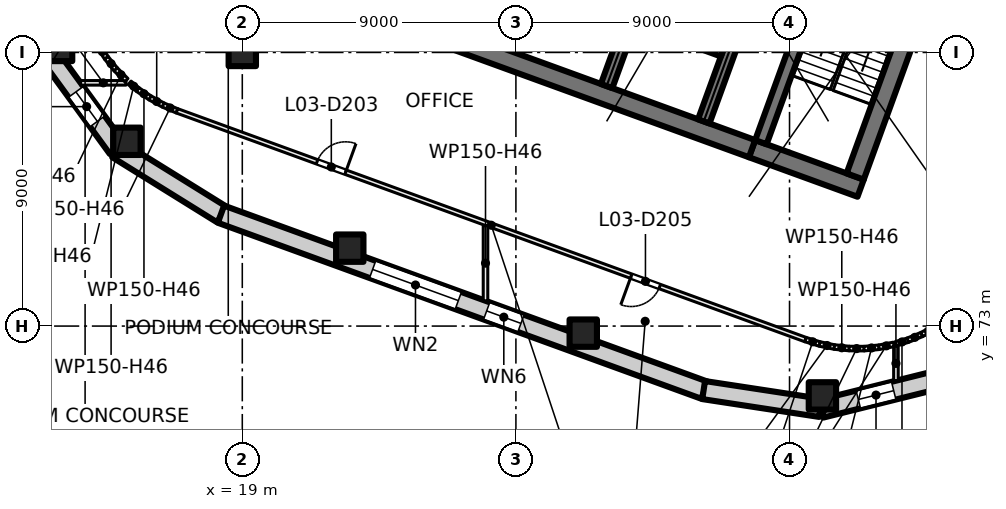
"""IFC4 building model, lengths in metres.
Left out: names, types, materials, properties, quantities, classifications, styles, units other than length and angle.
Written with IfcOpenShell. Run it as: python <this file> out.ifc"""

import sys

from ifc_helpers import new_model, si_unit, direction, frame, frame_2d, origin, origin_2d, place, context, subcontext, project, spatial, rectangle, extrude, element, fill, save


model = new_model("IFC4")
c1 = context("Model", 3, precision=1e-05, world=origin(), true_north=direction((0.0, 1.0)))
c2 = subcontext(c1, "Body", "Model", "MODEL_VIEW")
j1 = project(units=[si_unit("LENGTHUNIT", "METRE"), si_unit("PLANEANGLEUNIT", "RADIAN")], contexts=[c1])
p1 = place(None, origin())
s1 = spatial("IfcSite", under=j1, at=p1, CompositionType="ELEMENT")
p2 = place(p1, origin())
s2 = spatial("IfcBuilding", under=s1, at=p2, CompositionType="ELEMENT")
p3 = place(p2, frame((0.0, 0.0, 17.5)))
s3 = spatial("IfcBuildingStorey", under=s2, at=p3, CompositionType="ELEMENT", Elevation=17.5)
for number, where, z_axis, x_axis in (
    (1, (19.0, 82.0, 0.0), (0.0, 0.0, 1.0), (1.0, 0.0, 0.0)),
    (2, (38.082, 70.704, 0.0), (0.0, 0.0, 1.0), (1.0, 0.0, 0.0)),
    (3, (30.215, 72.768, 0.0), (0.0, 0.0, 1.0), (1.0, 0.0, 0.0)),
    (4, (22.535, 75.563, 0.0), (0.0, 0.0, 1.0), (1.0, 0.0, 0.0)),
    (5, (15.205, 79.078, 0.0), (0.0, 0.0, 1.0), (1.0, 0.0, 0.0)),
    (6, (12.958, 82.164, 0.0), (0.0, 0.0, 1.0), (1.0, 0.0, 0.0)),
):
    element("IfcColumn", number, at=place(p3, frame(where, z_axis=z_axis, x_axis=x_axis)), inside=s3, PredefinedType="COLUMN", context=c2, shape_type="SweptSolid", body=[
        extrude(rectangle(XDim=0.9, YDim=0.9, at=origin_2d()), origin(), (0.0, 0.0, 1.0), 5.0),
    ])
p4 = place(p3, frame((39.338, 77.535, 0.0), z_axis=(0.0, 0.0, 1.0), x_axis=(-0.939701471648, 0.341995824804, 0.0)))
e7 = element("IfcWall", 7, at=p4, inside=s3, PredefinedType="SHEAR", context=c2, shape_type="SweptSolid", body=[
    extrude(rectangle(XDim=3.8, YDim=0.6, at=frame_2d((1.9, 0.0))), origin(), (0.0, 0.0, 1.0), 5.0),
])
p5 = place(p3, frame((35.767, 78.835, 0.0), z_axis=(0.0, 0.0, 1.0), x_axis=(-0.939692894512, 0.342019391267, 0.0)))
e8 = element("IfcWall", 8, at=p5, inside=s3, PredefinedType="SHEAR", context=c2, shape_type="SweptSolid", body=[
    extrude(rectangle(XDim=14.4, YDim=0.6, at=frame_2d((7.2, 0.0))), origin(), (0.0, 0.0, 1.0), 5.0),
])
p6 = place(p3, frame((39.159, 77.92, 0.0), z_axis=(0.0, 0.0, 1.0), x_axis=(0.342016982193, 0.939693771338, 0.0)))
e9 = element("IfcWall", 9, at=p6, inside=s3, PredefinedType="SHEAR", context=c2, shape_type="SweptSolid", body=[
    extrude(rectangle(XDim=7.8, YDim=0.6, at=frame_2d((3.9, 0.0))), origin(), (0.0, 0.0, 1.0), 5.0),
])
p7 = place(p3, frame((36.058, 79.048, 0.0), z_axis=(0.0, 0.0, 1.0), x_axis=(0.342016982193, 0.939693771338, 0.0)))
e10 = element("IfcWall", 10, at=p7, inside=s3, PredefinedType="SHEAR", context=c2, shape_type="SweptSolid", body=[
    extrude(rectangle(XDim=7.8, YDim=0.4, at=frame_2d((3.9, 0.0))), origin(), (0.0, 0.0, 1.0), 5.0),
])
p8 = place(p3, frame((30.984, 80.895, 0.0), z_axis=(0.0, 0.0, 1.0), x_axis=(0.342021021735, 0.939692301071, 0.0)))
e11 = element("IfcWall", 11, at=p8, inside=s3, PredefinedType="SHEAR", context=c2, shape_type="SweptSolid", body=[
    extrude(rectangle(XDim=12.2, YDim=0.4, at=frame_2d((6.1, 0.0))), origin(), (0.0, 0.0, 1.0), 5.0),
])
p9 = place(p8, frame((5.45, 0.0, 0.0)))
e12 = element("IfcOpeningElement", 12, at=p9, cuts=e11, PredefinedType="OPENING", context=c2, shape_type="SweptSolid", body=[
    extrude(rectangle(XDim=1.1, YDim=2.1, at=frame_2d((0.55, 1.05))), frame((0.0, 0.21, 0.0), z_axis=(0.0, -1.0, 0.0), x_axis=(1.0, 0.0, 0.0)), (0.0, 0.0, 1.0), 0.42),
])
p10 = place(p8, frame((7.85, 0.0, 0.0)))
e13 = element("IfcOpeningElement", 13, at=p10, cuts=e11, PredefinedType="OPENING", context=c2, shape_type="SweptSolid", body=[
    extrude(rectangle(XDim=1.1, YDim=2.1, at=frame_2d((0.55, 1.05))), frame((0.0, 0.21, 0.0), z_axis=(0.0, -1.0, 0.0), x_axis=(1.0, 0.0, 0.0)), (0.0, 0.0, 1.0), 0.42),
])
p11 = place(p8, frame((10.25, 0.0, 0.0)))
e14 = element("IfcOpeningElement", 14, at=p11, cuts=e11, PredefinedType="OPENING", context=c2, shape_type="SweptSolid", body=[
    extrude(rectangle(XDim=1.1, YDim=2.1, at=frame_2d((0.55, 1.05))), frame((0.0, 0.21, 0.0), z_axis=(0.0, -1.0, 0.0), x_axis=(1.0, 0.0, 0.0)), (0.0, 0.0, 1.0), 0.42),
])
p12 = place(p3, frame((34.178, 79.732, 0.0), z_axis=(0.0, 0.0, 1.0), x_axis=(0.342014590177, 0.939694641948, 0.0)))
e15 = element("IfcWall", 15, at=p12, inside=s3, PredefinedType="SHEAR", context=c2, shape_type="SweptSolid", body=[
    extrude(rectangle(XDim=12.2, YDim=0.4, at=frame_2d((6.1, 0.0))), origin(), (0.0, 0.0, 1.0), 5.0),
])
p13 = place(p3, frame((34.812, 82.056, 0.0), z_axis=(0.0, 0.0, 1.0), x_axis=(-0.939686455819, 0.342037080957, 0.0)))
e16 = element("IfcWall", 16, at=p13, inside=s3, PredefinedType="SHEAR", context=c2, shape_type="SweptSolid", body=[
    extrude(rectangle(XDim=3.0, YDim=0.4, at=frame_2d((1.5, 0.0))), origin(), (0.0, 0.0, 1.0), 5.0),
])
p14 = place(p3, frame((12.571, 82.061, 0.0), z_axis=(0.0, 0.0, 1.0), x_axis=(-0.240896747667, 0.970550749298, 0.0)))
e17 = element("IfcWall", 17, at=p14, inside=s3, PredefinedType="SOLIDWALL", context=c2, shape_type="SweptSolid", body=[
    extrude(rectangle(XDim=3.962, YDim=0.6, at=frame_2d((1.981, 0.0))), origin(), (0.0, 0.0, 1.0), 4.6),
])
p15 = place(p3, frame((14.885, 78.837, 0.0), z_axis=(0.0, 0.0, 1.0), x_axis=(-0.588600339707, 0.808424170901, 0.0)))
e18 = element("IfcWall", 18, at=p15, inside=s3, PredefinedType="SOLIDWALL", context=c2, shape_type="SweptSolid", body=[
    extrude(rectangle(XDim=3.962, YDim=0.6, at=frame_2d((1.981, 0.0))), origin(), (0.0, 0.0, 1.0), 4.6),
])
p16 = place(p15, frame((1.108, 0.0, 0.9)))
e19 = element("IfcOpeningElement", 19, at=p16, cuts=e18, PredefinedType="OPENING", context=c2, shape_type="SweptSolid", body=[
    extrude(rectangle(XDim=1.2, YDim=3.0, at=frame_2d((0.6, 1.5))), frame((0.0, 0.31, 0.0), z_axis=(0.0, -1.0, 0.0), x_axis=(1.0, 0.0, 0.0)), (0.0, 0.0, 1.0), 0.62),
])
p17 = place(p3, frame((18.329, 76.668, 0.0), z_axis=(0.0, 0.0, 1.0), x_axis=(-0.849679171995, 0.527300013918, 0.0)))
e20 = element("IfcWall", 20, at=p17, inside=s3, PredefinedType="SOLIDWALL", context=c2, shape_type="SweptSolid", body=[
    extrude(rectangle(XDim=4.062, YDim=0.6, at=frame_2d((2.031, 0.0))), origin(), (0.0, 0.0, 1.0), 4.6),
])
p18 = place(p3, frame((34.204, 70.89, 0.0), z_axis=(0.0, 0.0, 1.0), x_axis=(-0.939693996621, 0.342016363227, 0.0)))
e21 = element("IfcWall", 21, at=p18, inside=s3, PredefinedType="SOLIDWALL", context=c2, shape_type="SweptSolid", body=[
    extrude(rectangle(XDim=16.926, YDim=0.6, at=frame_2d((8.463, 0.0))), origin(), (0.0, 0.0, 1.0), 4.6),
])
p19 = place(p18, frame((6.426, 0.0, 0.9)))
e22 = element("IfcOpeningElement", 22, at=p19, cuts=e21, PredefinedType="OPENING", context=c2, shape_type="SweptSolid", body=[
    extrude(rectangle(XDim=1.2, YDim=3.0, at=frame_2d((0.6, 1.5))), frame((0.0, 0.31, 0.0), z_axis=(0.0, -1.0, 0.0), x_axis=(1.0, 0.0, 0.0)), (0.0, 0.0, 1.0), 0.62),
])
p20 = place(p18, frame((8.618, 0.0, 0.9)))
e23 = element("IfcOpeningElement", 23, at=p20, cuts=e21, PredefinedType="OPENING", context=c2, shape_type="SweptSolid", body=[
    extrude(rectangle(XDim=3.0, YDim=3.0, at=frame_2d((1.5, 1.5))), frame((0.0, 0.31, 0.0), z_axis=(0.0, -1.0, 0.0), x_axis=(1.0, 0.0, 0.0)), (0.0, 0.0, 1.0), 0.62),
])
p21 = place(p3, frame((38.022, 70.308, 0.0), z_axis=(0.0, 0.0, 1.0), x_axis=(-0.98857030495, 0.150760578968, 0.0)))
e24 = element("IfcWall", 24, at=p21, inside=s3, PredefinedType="SOLIDWALL", context=c2, shape_type="SweptSolid", body=[
    extrude(rectangle(XDim=3.891, YDim=0.6, at=frame_2d((1.946, 0.0))), origin(), (0.0, 0.0, 1.0), 4.6),
])
p22 = place(p3, frame((41.954, 71.255, 0.0), z_axis=(0.0, 0.0, 1.0), x_axis=(-0.970377180078, -0.241594967628, 0.0)))
e25 = element("IfcWall", 25, at=p22, inside=s3, PredefinedType="SOLIDWALL", context=c2, shape_type="SweptSolid", body=[
    extrude(rectangle(XDim=4.031, YDim=0.6, at=frame_2d((2.016, 0.0))), origin(), (0.0, 0.0, 1.0), 4.6),
])
p23 = place(p22, frame((1.574, 0.0, 0.9)))
e26 = element("IfcOpeningElement", 26, at=p23, cuts=e25, PredefinedType="OPENING", context=c2, shape_type="SweptSolid", body=[
    extrude(rectangle(XDim=1.2, YDim=3.0, at=frame_2d((0.6, 1.5))), frame((0.0, 0.31, 0.0), z_axis=(0.0, -1.0, 0.0), x_axis=(1.0, 0.0, 0.0)), (0.0, 0.0, 1.0), 0.62),
])
p24 = place(p3, frame((13.681, 81.0, 0.0), z_axis=(0.0, 0.0, 1.0), x_axis=(1.0, 0.0, 0.0)))
e27 = element("IfcWall", 27, at=p24, inside=s3, PredefinedType="PARTITIONING", context=c2, shape_type="SweptSolid", body=[
    extrude(rectangle(XDim=1.495, YDim=0.15, at=frame_2d((0.748, 0.0))), origin(), (0.0, 0.0, 1.0), 4.6),
])
for number, where, z_axis, x_axis in (
    (28, (14.258, 82.234, 0.0), (0.0, 0.0, 1.0), (0.55, -0.835, 0.0)),
    (29, (14.528, 81.824, 0.0), (0.0, 0.0, 1.0), (0.629, -0.778, 0.0)),
):
    element("IfcWall", number, at=place(p3, frame(where, z_axis=z_axis, x_axis=x_axis)), inside=s3, PredefinedType="PARTITIONING", context=c2, shape_type="SweptSolid", body=[
        extrude(rectangle(XDim=0.498, YDim=0.15, at=frame_2d((0.249, 0.0))), origin(), (0.0, 0.0, 1.0), 4.6),
    ])
p25 = place(p3, frame((14.836, 81.443, 0.0), z_axis=(0.0, 0.0, 1.0), x_axis=(0.702939506556, -0.711249639805, 0.0)))
e30 = element("IfcWall", 30, at=p25, inside=s3, PredefinedType="PARTITIONING", context=c2, shape_type="SweptSolid", body=[
    extrude(rectangle(XDim=0.5, YDim=0.15, at=frame_2d((0.25, 0.0))), origin(), (0.0, 0.0, 1.0), 4.6),
])
p26 = place(p3, frame((15.294, 81.0, 0.0), z_axis=(0.0, 0.0, 1.0), x_axis=(0.770605931108, -0.637311932213, 0.0)))
e31 = element("IfcWall", 31, at=p26, inside=s3, PredefinedType="PARTITIONING", context=c2, shape_type="SweptSolid", body=[
    extrude(rectangle(XDim=0.352, YDim=0.15, at=frame_2d((0.176, 0.0))), origin(), (0.0, 0.0, 1.0), 4.6),
])
p27 = place(p3, frame((15.559, 80.78, 0.0), z_axis=(0.0, 0.0, 1.0), x_axis=(0.828490672822, -0.560002861641, 0.0)))
e32 = element("IfcWall", 32, at=p27, inside=s3, PredefinedType="PARTITIONING", context=c2, shape_type="SweptSolid", body=[
    extrude(rectangle(XDim=0.498, YDim=0.15, at=frame_2d((0.249, 0.0))), origin(), (0.0, 0.0, 1.0), 4.6),
])
p28 = place(p3, frame((15.966, 80.505, 0.0), z_axis=(0.0, 0.0, 1.0), x_axis=(0.878382708813, -0.477957965577, 0.0)))
e33 = element("IfcWall", 33, at=p28, inside=s3, PredefinedType="PARTITIONING", context=c2, shape_type="SweptSolid", body=[
    extrude(rectangle(XDim=0.498, YDim=0.15, at=frame_2d((0.249, 0.0))), origin(), (0.0, 0.0, 1.0), 4.6),
])
p29 = place(p3, frame((16.397, 80.27, 0.0), z_axis=(0.0, 0.0, 1.0), x_axis=(0.921848433773, -0.387550596891, 0.0)))
e34 = element("IfcWall", 34, at=p29, inside=s3, PredefinedType="PARTITIONING", context=c2, shape_type="SweptSolid", body=[
    extrude(rectangle(XDim=0.496, YDim=0.15, at=frame_2d((0.248, 0.0))), origin(), (0.0, 0.0, 1.0), 4.6),
])
p30 = place(p3, frame((37.528, 72.554, 0.0), z_axis=(0.0, 0.0, 1.0), x_axis=(-0.939693287343, 0.34201831197, 0.0)))
e35 = element("IfcWall", 35, at=p30, inside=s3, PredefinedType="PARTITIONING", context=c2, shape_type="SweptSolid", body=[
    extrude(rectangle(XDim=22.005, YDim=0.15, at=frame_2d((11.002, 0.0))), origin(), (0.0, 0.0, 1.0), 4.6),
])
p31 = place(p30, frame((16.101, 0.0, 0.0)))
e36 = element("IfcOpeningElement", 36, at=p31, cuts=e35, PredefinedType="OPENING", context=c2, shape_type="SweptSolid", body=[
    extrude(rectangle(XDim=1.0, YDim=2.1, at=frame_2d((0.5, 1.05))), frame((0.0, 0.085, 0.0), z_axis=(0.0, -1.0, 0.0), x_axis=(1.0, 0.0, 0.0)), (0.0, 0.0, 1.0), 0.17),
])
p32 = place(p30, frame((5.105, 0.0, 0.0)))
e37 = element("IfcOpeningElement", 37, at=p32, cuts=e35, PredefinedType="OPENING", context=c2, shape_type="SweptSolid", body=[
    extrude(rectangle(XDim=1.0, YDim=2.1, at=frame_2d((0.5, 1.05))), frame((0.0, 0.085, 0.0), z_axis=(0.0, -1.0, 0.0), x_axis=(1.0, 0.0, 0.0)), (0.0, 0.0, 1.0), 0.17),
])
p33 = place(p3, frame((27.0, 73.832, 0.0), z_axis=(0.0, 0.0, 1.0), x_axis=(0.0, 1.0, 0.0)))
e38 = element("IfcWall", 38, at=p33, inside=s3, PredefinedType="PARTITIONING", context=c2, shape_type="SweptSolid", body=[
    extrude(rectangle(XDim=2.474, YDim=0.15, at=frame_2d((1.237, 0.0))), origin(), (0.0, 0.0, 1.0), 4.6),
])
p34 = place(p3, frame((37.524, 72.556, 0.0), z_axis=(0.0, 0.0, 1.0), x_axis=(0.954987142797, -0.296647192964, 0.0)))
e39 = element("IfcWall", 39, at=p34, inside=s3, PredefinedType="PARTITIONING", context=c2, shape_type="SweptSolid", body=[
    extrude(rectangle(XDim=0.495, YDim=0.15, at=frame_2d((0.248, 0.0))), origin(), (0.0, 0.0, 1.0), 4.6),
])
p35 = place(p3, frame((37.99, 72.411, 0.0), z_axis=(0.0, 0.0, 1.0), x_axis=(0.979397350706, -0.201942638962, 0.0)))
e40 = element("IfcWall", 40, at=p35, inside=s3, PredefinedType="PARTITIONING", context=c2, shape_type="SweptSolid", body=[
    extrude(rectangle(XDim=0.499, YDim=0.15, at=frame_2d((0.25, 0.0))), origin(), (0.0, 0.0, 1.0), 4.6),
])
p36 = place(p3, frame((38.471, 72.311, 0.0), z_axis=(0.0, 0.0, 1.0), x_axis=(0.994949544905, -0.100376307434, 0.0)))
e41 = element("IfcWall", 41, at=p36, inside=s3, PredefinedType="PARTITIONING", context=c2, shape_type="SweptSolid", body=[
    extrude(rectangle(XDim=0.499, YDim=0.15, at=frame_2d((0.249, 0.0))), origin(), (0.0, 0.0, 1.0), 4.6),
])
p37 = place(p3, frame((38.959, 72.261, 0.0), z_axis=(0.0, 0.0, 1.0), x_axis=(0.999982767056, -0.005870740315, 0.0)))
e42 = element("IfcWall", 42, at=p37, inside=s3, PredefinedType="PARTITIONING", context=c2, shape_type="SweptSolid", body=[
    extrude(rectangle(XDim=0.499, YDim=0.15, at=frame_2d((0.25, 0.0))), origin(), (0.0, 0.0, 1.0), 4.6),
])
p38 = place(p3, frame((39.45, 72.258, 0.0), z_axis=(0.0, 0.0, 1.0), x_axis=(0.995925282781, 0.090182210646, 0.0)))
e43 = element("IfcWall", 43, at=p38, inside=s3, PredefinedType="PARTITIONING", context=c2, shape_type="SweptSolid", body=[
    extrude(rectangle(XDim=0.498, YDim=0.15, at=frame_2d((0.249, 0.0))), origin(), (0.0, 0.0, 1.0), 4.6),
])
p39 = place(p3, frame((39.938, 72.302, 0.0), z_axis=(0.0, 0.0, 1.0), x_axis=(0.981729772821, 0.190280459207, 0.0)))
e44 = element("IfcWall", 44, at=p39, inside=s3, PredefinedType="PARTITIONING", context=c2, shape_type="SweptSolid", body=[
    extrude(rectangle(XDim=0.499, YDim=0.15, at=frame_2d((0.25, 0.0))), origin(), (0.0, 0.0, 1.0), 4.6),
])
p40 = place(p3, frame((40.5, 71.203, 0.0), z_axis=(0.0, 0.0, 1.0), x_axis=(0.0, 1.0, 0.0)))
e45 = element("IfcWall", 45, at=p40, inside=s3, PredefinedType="PARTITIONING", context=c2, shape_type="SweptSolid", body=[
    extrude(rectangle(XDim=1.138, YDim=0.15, at=frame_2d((0.569, 0.0))), origin(), (0.0, 0.0, 1.0), 4.6),
])
p41 = place(p3, frame((40.5, 72.419, 0.0), z_axis=(0.0, 0.0, 1.0), x_axis=(0.958631822216, 0.284648958253, 0.0)))
e46 = element("IfcWall", 46, at=p41, inside=s3, PredefinedType="PARTITIONING", context=c2, shape_type="SweptSolid", body=[
    extrude(rectangle(XDim=0.415, YDim=0.15, at=frame_2d((0.208, 0.0))), origin(), (0.0, 0.0, 1.0), 4.6),
])
for number, where, z_axis, x_axis in (
    (47, (40.891, 72.535, 0.0), (0.0, 0.0, 1.0), (0.926, 0.378, 0.0)),
    (48, (41.346, 72.72, 0.0), (0.0, 0.0, 1.0), (0.884, 0.468, 0.0)),
):
    element("IfcWall", number, at=place(p3, frame(where, z_axis=z_axis, x_axis=x_axis)), inside=s3, PredefinedType="PARTITIONING", context=c2, shape_type="SweptSolid", body=[
        extrude(rectangle(XDim=0.498, YDim=0.15, at=frame_2d((0.249, 0.0))), origin(), (0.0, 0.0, 1.0), 4.6),
    ])
p42 = place(p16, origin())
e49 = element("IfcWindow", 49, at=p42, inside=s3, PartitioningType="SINGLE_PANEL", PredefinedType="WINDOW", context=c2, shape_type="SweptSolid", body=[
    extrude(rectangle(XDim=1.2, YDim=3.0, at=frame_2d((0.6, 1.5))), frame((0.0, 0.03, 0.0), z_axis=(0.0, -1.0, 0.0), x_axis=(1.0, 0.0, 0.0)), (0.0, 0.0, 1.0), 0.06),
])
fill(e19, e49)
p43 = place(p19, origin())
e50 = element("IfcWindow", 50, at=p43, inside=s3, PartitioningType="SINGLE_PANEL", PredefinedType="WINDOW", context=c2, shape_type="SweptSolid", body=[
    extrude(rectangle(XDim=1.2, YDim=3.0, at=frame_2d((0.6, 1.5))), frame((0.0, 0.03, 0.0), z_axis=(0.0, -1.0, 0.0), x_axis=(1.0, 0.0, 0.0)), (0.0, 0.0, 1.0), 0.06),
])
fill(e22, e50)
p44 = place(p20, origin())
e51 = element("IfcWindow", 51, at=p44, inside=s3, PartitioningType="SINGLE_PANEL", PredefinedType="WINDOW", context=c2, shape_type="SweptSolid", body=[
    extrude(rectangle(XDim=3.0, YDim=3.0, at=frame_2d((1.5, 1.5))), frame((0.0, 0.03, 0.0), z_axis=(0.0, -1.0, 0.0), x_axis=(1.0, 0.0, 0.0)), (0.0, 0.0, 1.0), 0.06),
])
fill(e23, e51)
p45 = place(p23, origin())
e52 = element("IfcWindow", 52, at=p45, inside=s3, PartitioningType="SINGLE_PANEL", PredefinedType="WINDOW", context=c2, shape_type="SweptSolid", body=[
    extrude(rectangle(XDim=1.2, YDim=3.0, at=frame_2d((0.6, 1.5))), frame((0.0, 0.03, 0.0), z_axis=(0.0, -1.0, 0.0), x_axis=(1.0, 0.0, 0.0)), (0.0, 0.0, 1.0), 0.06),
])
fill(e26, e52)
p46 = place(p31, origin())
e53 = element("IfcDoor", 53, at=p46, inside=s3, OperationType="SINGLE_SWING_LEFT", PredefinedType="DOOR", context=c2, shape_type="SweptSolid", body=[
    extrude(rectangle(XDim=1.0, YDim=2.1, at=frame_2d((0.5, 1.05))), frame((0.0, 0.025, 0.0), z_axis=(0.0, -1.0, 0.0), x_axis=(1.0, 0.0, 0.0)), (0.0, 0.0, 1.0), 0.05),
])
fill(e36, e53)
p47 = place(p32, origin())
e54 = element("IfcDoor", 54, at=p47, inside=s3, OperationType="SINGLE_SWING_RIGHT", PredefinedType="DOOR", context=c2, shape_type="SweptSolid", body=[
    extrude(rectangle(XDim=1.0, YDim=2.1, at=frame_2d((0.5, 1.05))), frame((0.0, 0.025, 0.0), z_axis=(0.0, -1.0, 0.0), x_axis=(1.0, 0.0, 0.0)), (0.0, 0.0, 1.0), 0.05),
])
fill(e37, e54)
save(model, sys.argv[1])
